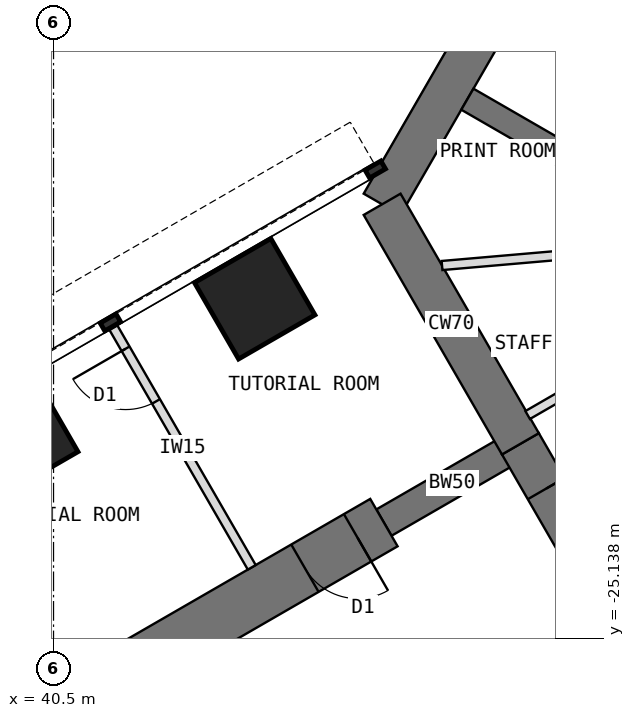
"""IFC4 building model, lengths in metres.
Left out: names, types, materials, properties, quantities, classifications, styles, units other than length and angle.
Written with IfcOpenShell. Run it as: python <this file> out.ifc"""

import sys

from ifc_helpers import new_model, si_unit, direction, frame, frame_2d, origin, origin_2d, place, context, subcontext, project, spatial, rectangle, extrude, element, fill, save


model = new_model("IFC4")
c1 = context("Model", 3, precision=1e-05, world=origin(), true_north=direction((0.0, 1.0)))
c2 = subcontext(c1, "Body", "Model", "MODEL_VIEW")
j1 = project(units=[si_unit("LENGTHUNIT", "METRE"), si_unit("PLANEANGLEUNIT", "RADIAN")], contexts=[c1])
p1 = place(None, origin())
s1 = spatial("IfcSite", under=j1, at=p1, CompositionType="ELEMENT")
p2 = place(p1, origin())
s2 = spatial("IfcBuilding", under=s1, at=p2, CompositionType="ELEMENT")
p3 = place(p2, frame((0.0, 0.0, 68.5)))
s3 = spatial("IfcBuildingStorey", under=s2, at=p3, CompositionType="ELEMENT", Elevation=68.5)
p4 = place(p3, frame((52.202, -7.092, 0.0), z_axis=(0.0, 0.0, 1.0), x_axis=(-0.500005998175, -0.866021940709, 0.0)))
e1 = element("IfcWall", 1, at=p4, inside=s3, PredefinedType="SHEAR", context=c2, shape_type="SweptSolid", body=[
    extrude(rectangle(XDim=12.596, YDim=0.7, at=frame_2d((6.298, 0.0))), origin(), (0.0, 0.0, 1.0), 4.0),
])
p5 = place(p3, frame((45.904, -18.0, 0.0), z_axis=(0.0, 0.0, 1.0), x_axis=(0.500024481964, -0.866011268655, 0.0)))
e2 = element("IfcWall", 2, at=p5, inside=s3, PredefinedType="SHEAR", context=c2, shape_type="SweptSolid", body=[
    extrude(rectangle(XDim=4.548, YDim=0.7, at=frame_2d((2.274, 0.0))), origin(), (0.0, 0.0, 1.0), 4.0),
])
p6 = place(p3, frame((48.178, -21.939, 0.0), z_axis=(0.0, 0.0, 1.0), x_axis=(0.500010275428, -0.866019471182, 0.0)))
e3 = element("IfcWall", 3, at=p6, inside=s3, PredefinedType="SHEAR", context=c2, shape_type="SweptSolid", body=[
    extrude(rectangle(XDim=3.5, YDim=0.7, at=frame_2d((1.75, 0.0))), origin(), (0.0, 0.0, 1.0), 4.0),
])
p7 = place(p6, frame((0.85, 0.0, 0.0)))
e4 = element("IfcOpeningElement", 4, at=p7, cuts=e3, PredefinedType="OPENING", context=c2, shape_type="SweptSolid", body=[
    extrude(rectangle(XDim=1.8, YDim=2.1, at=frame_2d((0.9, 1.05))), frame((0.0, 0.36, 0.0), z_axis=(0.0, -1.0, 0.0), x_axis=(1.0, 0.0, 0.0)), (0.0, 0.0, 1.0), 0.72),
])
for number, where, z_axis, x_axis in (
    (5, (49.928, -24.97, 0.0), (0.0, 0.0, 1.0), (-0.866, -0.5, 0.0)),
    (6, (48.178, -21.939, 0.0), (0.0, 0.0, 1.0), (-0.866, -0.5, 0.0)),
):
    element("IfcWall", number, at=place(p3, frame(where, z_axis=z_axis, x_axis=x_axis)), inside=s3, PredefinedType="SHEAR", context=c2, shape_type="SweptSolid", body=[
        extrude(rectangle(XDim=2.592, YDim=0.5, at=frame_2d((1.296, 0.0))), origin(), (0.0, 0.0, 1.0), 4.0),
    ])
p8 = place(p3, frame((45.934, -23.234, 0.0), z_axis=(0.0, 0.0, 1.0), x_axis=(-0.866019570528, -0.500010103361, 0.0)))
e7 = element("IfcWall", 7, at=p8, inside=s3, PredefinedType="SHEAR", context=c2, shape_type="SweptSolid", body=[
    extrude(rectangle(XDim=13.2, YDim=0.9, at=frame_2d((6.6, 0.0))), origin(), (0.0, 0.0, 1.0), 4.0),
])
p9 = place(p8, frame((0.5, 0.0, 0.0)))
e8 = element("IfcOpeningElement", 8, at=p9, cuts=e7, PredefinedType="OPENING", context=c2, shape_type="SweptSolid", body=[
    extrude(rectangle(XDim=1.0, YDim=2.1, at=frame_2d((0.5, 1.05))), frame((0.0, 0.46, 0.0), z_axis=(0.0, -1.0, 0.0), x_axis=(1.0, 0.0, 0.0)), (0.0, 0.0, 1.0), 0.92),
])
p10 = place(p8, frame((7.25, 0.0, 0.0)))
e9 = element("IfcOpeningElement", 9, at=p10, cuts=e7, PredefinedType="OPENING", context=c2, shape_type="SweptSolid", body=[
    extrude(rectangle(XDim=1.0, YDim=2.1, at=frame_2d((0.5, 1.05))), frame((0.0, 0.46, 0.0), z_axis=(0.0, -1.0, 0.0), x_axis=(1.0, 0.0, 0.0)), (0.0, 0.0, 1.0), 0.92),
])
for number, where, z_axis, x_axis in (
    (10, (43.809, -19.554, 0.0), (0.0, 0.0, 1.0), (0.866, 0.5, 0.0)),
    (11, (39.912, -21.804, 0.0), (0.0, 0.0, 1.0), (0.866, 0.5, 0.0)),
):
    element("IfcColumn", number, at=place(p3, frame(where, z_axis=z_axis, x_axis=x_axis)), inside=s3, PredefinedType="COLUMN", context=c2, shape_type="SweptSolid", body=[
        extrude(rectangle(XDim=1.45, YDim=1.45, at=origin_2d()), origin(), (0.0, 0.0, 1.0), 4.0),
    ])
p11 = place(p3, frame((52.38, -19.201, 0.0), z_axis=(0.0, 0.0, 1.0), x_axis=(-0.866023886965, 0.500002627198, 0.0)))
e12 = element("IfcWall", 12, at=p11, inside=s3, PredefinedType="SHEAR", context=c2, shape_type="SweptSolid", body=[
    extrude(rectangle(XDim=5.858, YDim=0.4, at=frame_2d((2.929, 0.0))), origin(), (0.0, 0.0, 1.0), 4.0),
])
p12 = place(p3, frame((43.76, -23.97, 0.0), z_axis=(0.0, 0.0, 1.0), x_axis=(-0.499982560684, 0.866035472144, 0.0)))
e13 = element("IfcWall", 13, at=p12, inside=s3, PredefinedType="PARTITIONING", context=c2, shape_type="SweptSolid", body=[
    extrude(rectangle(XDim=4.55, YDim=0.15, at=frame_2d((2.275, 0.0))), origin(), (0.0, 0.0, 1.0), 3.8),
])
p13 = place(p12, frame((3.15, 0.0, 0.0)))
e14 = element("IfcOpeningElement", 14, at=p13, cuts=e13, PredefinedType="OPENING", context=c2, shape_type="SweptSolid", body=[
    extrude(rectangle(XDim=1.0, YDim=2.1, at=frame_2d((0.5, 1.05))), frame((0.0, 0.085, 0.0), z_axis=(0.0, -1.0, 0.0), x_axis=(1.0, 0.0, 0.0)), (0.0, 0.0, 1.0), 0.17),
])
p14 = place(p3, frame((48.298, -21.466, 0.0), z_axis=(0.0, 0.0, 1.0), x_axis=(0.866021148949, 0.500007369519, 0.0)))
e15 = element("IfcWall", 15, at=p14, inside=s3, PredefinedType="PARTITIONING", context=c2, shape_type="SweptSolid", body=[
    extrude(rectangle(XDim=4.426, YDim=0.15, at=frame_2d((2.213, 0.0))), origin(), (0.0, 0.0, 1.0), 3.8),
])
p15 = place(p14, frame((2.598, 0.0, 0.0)))
e16 = element("IfcOpeningElement", 16, at=p15, cuts=e15, PredefinedType="OPENING", context=c2, shape_type="SweptSolid", body=[
    extrude(rectangle(XDim=1.0, YDim=2.1, at=frame_2d((0.5, 1.05))), frame((0.0, 0.085, 0.0), z_axis=(0.0, -1.0, 0.0), x_axis=(1.0, 0.0, 0.0)), (0.0, 0.0, 1.0), 0.17),
])
p16 = place(p3, frame((51.371, -18.618, 0.0), z_axis=(0.0, 0.0, 1.0), x_axis=(-0.996259708579, -0.086409450071, 0.0)))
e17 = element("IfcWall", 17, at=p16, inside=s3, PredefinedType="PARTITIONING", context=c2, shape_type="SweptSolid", body=[
    extrude(rectangle(XDim=4.498, YDim=0.15, at=frame_2d((2.249, 0.0))), origin(), (0.0, 0.0, 1.0), 3.8),
])
p17 = place(p16, frame((0.849, 0.0, 0.0)))
e18 = element("IfcOpeningElement", 18, at=p17, cuts=e17, PredefinedType="OPENING", context=c2, shape_type="SweptSolid", body=[
    extrude(rectangle(XDim=1.0, YDim=2.1, at=frame_2d((0.5, 1.05))), frame((0.0, 0.085, 0.0), z_axis=(0.0, -1.0, 0.0), x_axis=(1.0, 0.0, 0.0)), (0.0, 0.0, 1.0), 0.17),
])
p18 = place(p7, origin())
e19 = element("IfcDoor", 19, at=p18, inside=s3, OperationType="DOUBLE_DOOR_DOUBLE_SWING", PredefinedType="DOOR", context=c2, shape_type="SweptSolid", body=[
    extrude(rectangle(XDim=1.72, YDim=2.06, at=frame_2d((0.9, 1.03))), frame((0.0, 0.025, 0.0), z_axis=(0.0, -1.0, 0.0), x_axis=(1.0, 0.0, 0.0)), (0.0, 0.0, 1.0), 0.05),
    extrude(rectangle(XDim=0.04, YDim=2.1, at=frame_2d((0.02, 1.05))), frame((0.0, 0.35, 0.0), z_axis=(0.0, -1.0, 0.0), x_axis=(1.0, 0.0, 0.0)), (0.0, 0.0, 1.0), 0.699),
    extrude(rectangle(XDim=0.04, YDim=2.1, at=frame_2d((1.78, 1.05))), frame((0.0, 0.35, 0.0), z_axis=(0.0, -1.0, 0.0), x_axis=(1.0, 0.0, 0.0)), (0.0, 0.0, 1.0), 0.699),
    extrude(rectangle(XDim=1.72, YDim=0.04, at=frame_2d((0.9, 2.08))), frame((0.0, 0.35, 0.0), z_axis=(0.0, -1.0, 0.0), x_axis=(1.0, 0.0, 0.0)), (0.0, 0.0, 1.0), 0.699),
])
fill(e4, e19)
p19 = place(p13, origin())
e20 = element("IfcDoor", 20, at=p19, inside=s3, OperationType="SINGLE_SWING_RIGHT", PredefinedType="DOOR", context=c2, shape_type="SweptSolid", body=[
    extrude(rectangle(XDim=1.0, YDim=2.1, at=frame_2d((0.5, 1.05))), frame((0.0, 0.025, 0.0), z_axis=(0.0, -1.0, 0.0), x_axis=(1.0, 0.0, 0.0)), (0.0, 0.0, 1.0), 0.05),
])
fill(e14, e20)
p20 = place(p9, origin())
e21 = element("IfcDoor", 21, at=p20, inside=s3, OperationType="SINGLE_SWING_LEFT", PredefinedType="DOOR", context=c2, shape_type="SweptSolid", body=[
    extrude(rectangle(XDim=0.92, YDim=2.06, at=frame_2d((0.5, 1.03))), frame((0.0, 0.025, 0.0), z_axis=(0.0, -1.0, 0.0), x_axis=(1.0, 0.0, 0.0)), (0.0, 0.0, 1.0), 0.05),
    extrude(rectangle(XDim=0.04, YDim=2.1, at=frame_2d((0.02, 1.05))), frame((0.0, 0.45, 0.0), z_axis=(0.0, -1.0, 0.0), x_axis=(1.0, 0.0, 0.0)), (0.0, 0.0, 1.0), 0.899),
    extrude(rectangle(XDim=0.04, YDim=2.1, at=frame_2d((0.98, 1.05))), frame((0.0, 0.45, 0.0), z_axis=(0.0, -1.0, 0.0), x_axis=(1.0, 0.0, 0.0)), (0.0, 0.0, 1.0), 0.899),
    extrude(rectangle(XDim=0.92, YDim=0.04, at=frame_2d((0.5, 2.08))), frame((0.0, 0.45, 0.0), z_axis=(0.0, -1.0, 0.0), x_axis=(1.0, 0.0, 0.0)), (0.0, 0.0, 1.0), 0.899),
])
fill(e8, e21)
save(model, sys.argv[1])
